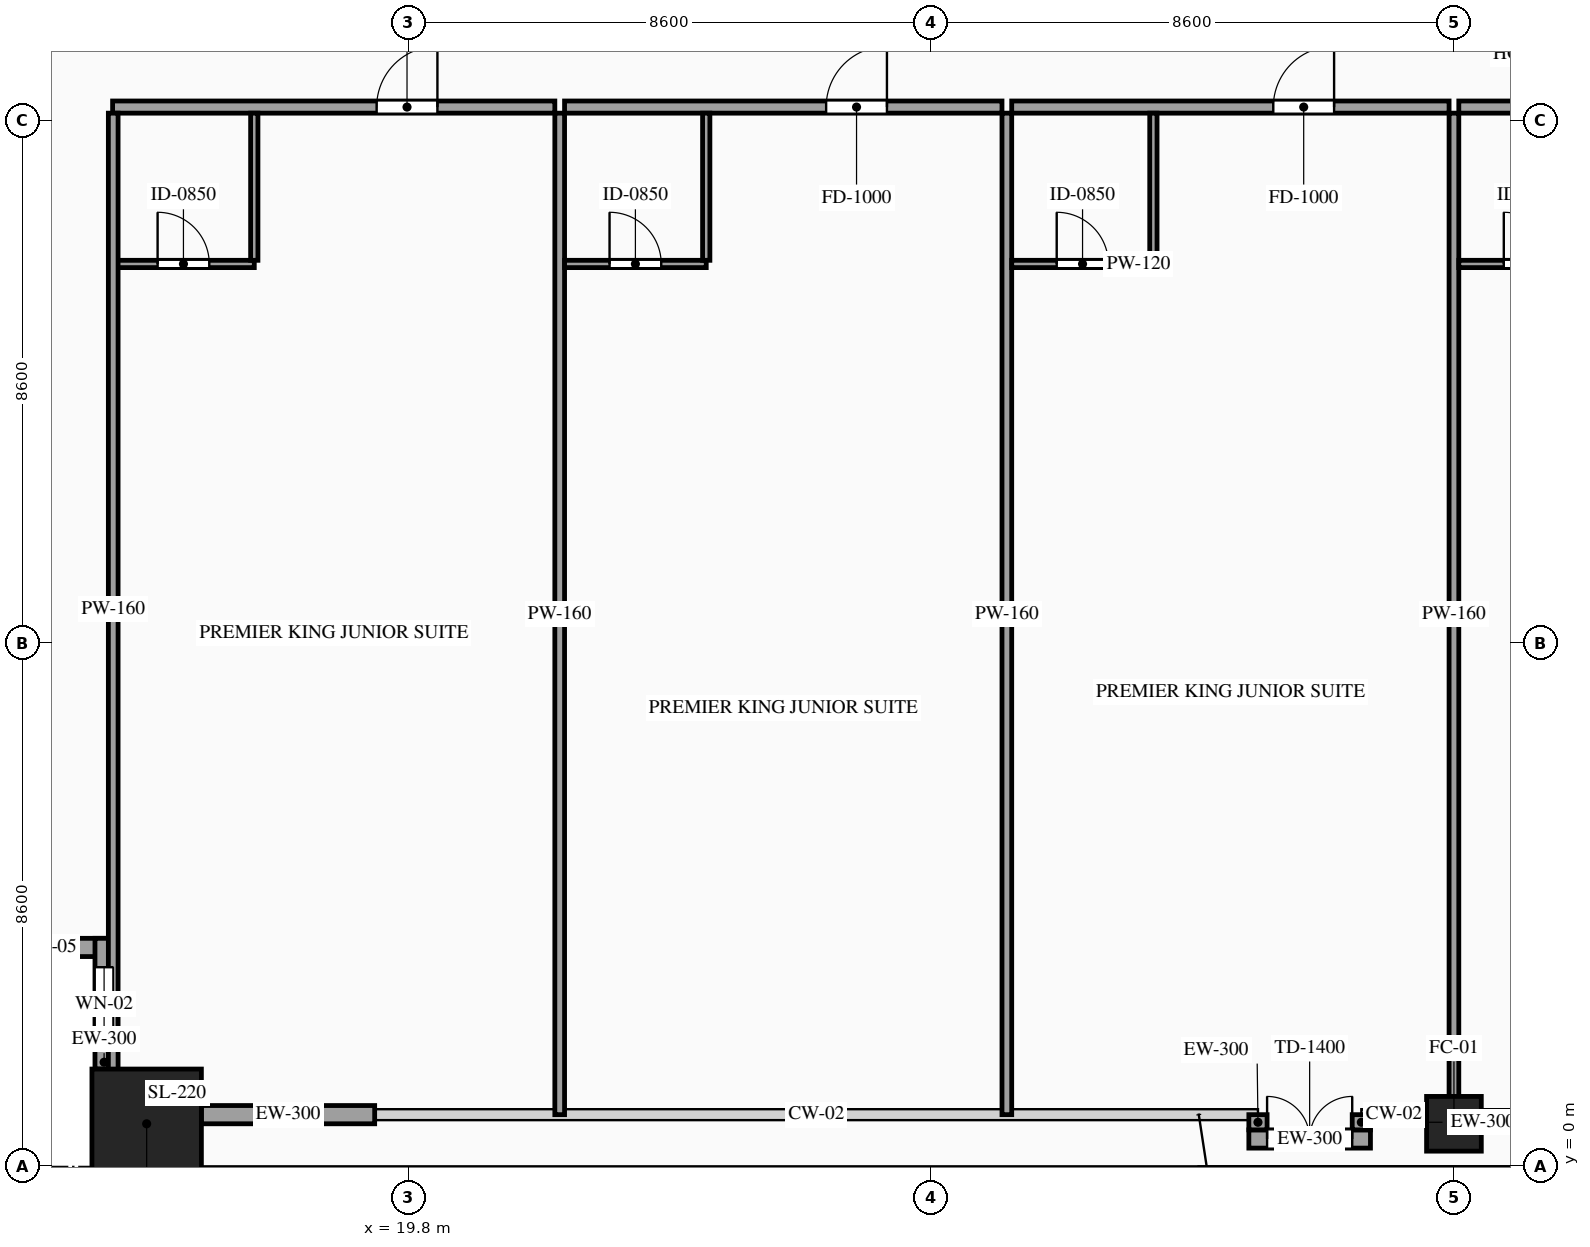
"""IFC4 building model, lengths in metres.
Left out: names, types, materials, properties, quantities, classifications, styles, units other than length and angle.
Written with IfcOpenShell. Run it as: python <this file> out.ifc"""

import sys

from ifc_helpers import new_model, si_unit, direction, frame, frame_2d, origin, origin_2d, place, context, subcontext, project, spatial, rectangle, hollow_rectangle, extrude, source, transform, mapped, element, fill, save


model = new_model("IFC4")
c1 = context("Model", 3, precision=1e-05, world=origin(), true_north=direction((0.0, 1.0)))
c2 = subcontext(c1, "Body", "Model", "MODEL_VIEW")
j1 = project(units=[si_unit("LENGTHUNIT", "METRE"), si_unit("PLANEANGLEUNIT", "RADIAN")], contexts=[c1])
p1 = place(None, origin())
s1 = spatial("IfcSite", under=j1, at=p1, CompositionType="ELEMENT")
p2 = place(p1, origin())
s2 = spatial("IfcBuilding", under=s1, at=p2, CompositionType="ELEMENT")
p3 = place(p2, frame((0.0, 0.0, 34.2)))
s3 = spatial("IfcBuildingStorey", under=s2, at=p3, CompositionType="ELEMENT", Elevation=34.2)
m1 = source(origin(), c2, "Body", "SweptSolid", [
    extrude(hollow_rectangle(XDim=1.8, YDim=1.8, WallThickness=0.08, at=origin_2d()), origin(), (0.0, 0.0, 1.0), 3.6),
])
p4 = place(p3, frame((15.5, 0.7, 0.0), z_axis=(0.0, 0.0, 1.0), x_axis=(1.0, 0.0, 0.0)))
e1 = element("IfcColumn", 1, at=p4, inside=s3, PredefinedType="COLUMN", context=c2, shape_type="MappedRepresentation", body=[
    mapped(m1, transform((0.0, 0.0, 0.0), scale=1.0)),
])
m2 = source(origin(), c2, "Body", "SweptSolid", [
    extrude(hollow_rectangle(XDim=0.9, YDim=0.9, WallThickness=0.042, at=origin_2d()), origin(), (0.0, 0.0, 1.0), 3.6),
])
p5 = place(p3, frame((37.0, 0.7, 0.0), z_axis=(0.0, 0.0, 1.0), x_axis=(1.0, 0.0, 0.0)))
e2 = element("IfcColumn", 2, at=p5, inside=s3, PredefinedType="COLUMN", context=c2, shape_type="MappedRepresentation", body=[
    mapped(m2, transform((0.0, 0.0, 0.0), scale=1.0)),
])
p6 = place(p3, frame((12.8, 3.6, 0.0), z_axis=(0.0, 0.0, 1.0), x_axis=(1.0, 0.0, 0.0)))
e3 = element("IfcWall", 3, at=p6, inside=s3, PredefinedType="SOLIDWALL", context=c2, shape_type="SweptSolid", body=[
    extrude(rectangle(XDim=2.15, YDim=0.3, at=frame_2d((1.075, 0.0))), origin(), (0.0, 0.0, 1.0), 3.38),
])
p7 = place(p6, frame((0.625, 0.0, 0.85)))
e4 = element("IfcOpeningElement", 4, at=p7, cuts=e3, PredefinedType="OPENING", context=c2, shape_type="SweptSolid", body=[
    extrude(rectangle(XDim=0.9, YDim=1.5, at=frame_2d((0.45, 0.75))), frame((0.0, 0.165, 0.0), z_axis=(0.0, -1.0, 0.0), x_axis=(1.0, 0.0, 0.0)), (0.0, 0.0, 1.0), 0.33),
])
p8 = place(p3, frame((14.8, 3.75, 0.0), z_axis=(0.0, 0.0, 1.0), x_axis=(0.0, -1.0, 0.0)))
e5 = element("IfcWall", 5, at=p8, inside=s3, PredefinedType="SOLIDWALL", context=c2, shape_type="SweptSolid", body=[
    extrude(rectangle(XDim=2.15, YDim=0.3, at=frame_2d((1.075, 0.0))), origin(), (0.0, 0.0, 1.0), 3.38),
])
p9 = place(p8, frame((0.475, 0.0, 0.85)))
e6 = element("IfcOpeningElement", 6, at=p9, cuts=e5, PredefinedType="OPENING", context=c2, shape_type="SweptSolid", body=[
    extrude(rectangle(XDim=1.2, YDim=2.1, at=frame_2d((0.6, 1.05))), frame((0.0, 0.165, 0.0), z_axis=(0.0, -1.0, 0.0), x_axis=(1.0, 0.0, 0.0)), (0.0, 0.0, 1.0), 0.33),
])
m3 = source(origin(), c2, "Body", "SweptSolid", [
    extrude(rectangle(XDim=2.85, YDim=0.3, at=frame_2d((1.425, 0.0))), origin(), (0.0, 0.0, 1.0), 2.775),
])
p10 = place(p3, frame((16.4, 0.85, 0.0), z_axis=(0.0, 0.0, 1.0), x_axis=(1.0, 0.0, 0.0)))
e7 = element("IfcWall", 7, at=p10, inside=s3, PredefinedType="SOLIDWALL", context=c2, shape_type="MappedRepresentation", body=[
    mapped(m3, transform((0.0, 0.0, 0.0), scale=1.0)),
])
p11 = place(p3, frame((33.627, 0.45, 0.0), z_axis=(0.0, 0.0, 1.0), x_axis=(1.0, 0.0, 0.0)))
e8 = element("IfcWall", 8, at=p11, inside=s3, PredefinedType="SOLIDWALL", context=c2, shape_type="SweptSolid", body=[
    extrude(rectangle(XDim=2.0, YDim=0.3, at=frame_2d((1.0, 0.0))), origin(), (0.0, 0.0, 1.0), 3.38),
])
p12 = place(p11, frame((0.3, 0.0, 0.0)))
e9 = element("IfcOpeningElement", 9, at=p12, cuts=e8, PredefinedType="OPENING", context=c2, shape_type="SweptSolid", body=[
    extrude(rectangle(XDim=1.4, YDim=2.3, at=frame_2d((0.7, 1.15))), frame((0.0, 0.165, 0.0), z_axis=(0.0, -1.0, 0.0), x_axis=(1.0, 0.0, 0.0)), (0.0, 0.0, 1.0), 0.33),
])
m4 = source(origin(), c2, "Body", "SweptSolid", [
    extrude(rectangle(XDim=0.25, YDim=0.3, at=frame_2d((0.125, 0.0))), origin(), (0.0, 0.0, 1.0), 3.38),
])
for number, where, z_axis, x_axis in (
    (10, (33.777, 0.85, 0.0), (0.0, 0.0, 1.0), (0.0, -1.0, 0.0)),
    (11, (35.477, 0.6, 0.0), (0.0, 0.0, 1.0), (0.0, 1.0, 0.0)),
):
    element("IfcWall", number, at=place(p3, frame(where, z_axis=z_axis, x_axis=x_axis)), inside=s3, PredefinedType="SOLIDWALL", context=c2, shape_type="MappedRepresentation", body=[
        mapped(m4, transform((0.0, 0.0, 0.0), scale=1.0)),
    ])
p13 = place(p3, frame((14.94, 17.42, 0.0), z_axis=(0.0, 0.0, 1.0), x_axis=(1.0, 0.0, 0.0)))
e12 = element("IfcWall", 12, at=p13, inside=s3, PredefinedType="PARTITIONING", context=c2, shape_type="SweptSolid", body=[
    extrude(rectangle(XDim=7.273, YDim=0.2, at=frame_2d((3.636, 0.0))), origin(), (0.0, 0.0, 1.0), 3.38),
])
p14 = place(p13, frame((4.342, 0.0, 0.0)))
e13 = element("IfcOpeningElement", 13, at=p14, cuts=e12, PredefinedType="OPENING", context=c2, shape_type="SweptSolid", body=[
    extrude(rectangle(XDim=1.0, YDim=2.2, at=frame_2d((0.5, 1.1))), frame((0.0, 0.115, 0.0), z_axis=(0.0, -1.0, 0.0), x_axis=(1.0, 0.0, 0.0)), (0.0, 0.0, 1.0), 0.23),
])
m5 = source(origin(), c2, "Body", "SweptSolid", [
    extrude(rectangle(XDim=16.47, YDim=0.16, at=frame_2d((8.235, 0.0))), origin(), (0.0, 0.0, 1.0), 3.38),
])
p15 = place(p3, frame((22.293, 0.85, 0.0), z_axis=(0.0, 0.0, 1.0), x_axis=(0.0, 1.0, 0.0)))
e14 = element("IfcWall", 14, at=p15, inside=s3, PredefinedType="PARTITIONING", context=c2, shape_type="MappedRepresentation", body=[
    mapped(m5, transform((0.0, 0.0, 0.0), scale=1.0)),
])
p16 = place(p3, frame((14.94, 14.84, 0.0), z_axis=(0.0, 0.0, 1.0), x_axis=(1.0, 0.0, 0.0)))
e15 = element("IfcWall", 15, at=p16, inside=s3, PredefinedType="PARTITIONING", context=c2, shape_type="SweptSolid", body=[
    extrude(rectangle(XDim=2.33, YDim=0.12, at=frame_2d((1.165, 0.0))), origin(), (0.0, 0.0, 1.0), 3.38),
])
p17 = place(p16, frame((0.74, 0.0, 0.0)))
e16 = element("IfcOpeningElement", 16, at=p17, cuts=e15, PredefinedType="OPENING", context=c2, shape_type="SweptSolid", body=[
    extrude(rectangle(XDim=0.85, YDim=2.1, at=frame_2d((0.425, 1.05))), frame((0.0, 0.075, 0.0), z_axis=(0.0, -1.0, 0.0), x_axis=(1.0, 0.0, 0.0)), (0.0, 0.0, 1.0), 0.15),
])
m6 = source(origin(), c2, "Body", "SweptSolid", [
    extrude(rectangle(XDim=2.42, YDim=0.12, at=frame_2d((1.21, 0.0))), origin(), (0.0, 0.0, 1.0), 3.38),
])
p18 = place(p3, frame((17.27, 14.9, 0.0), z_axis=(0.0, 0.0, 1.0), x_axis=(0.0, 1.0, 0.0)))
e17 = element("IfcWall", 17, at=p18, inside=s3, PredefinedType="PARTITIONING", context=c2, shape_type="MappedRepresentation", body=[
    mapped(m6, transform((0.0, 0.0, 0.0), scale=1.0)),
])
p19 = place(p3, frame((22.373, 17.42, 0.0), z_axis=(0.0, 0.0, 1.0), x_axis=(1.0, 0.0, 0.0)))
e18 = element("IfcWall", 18, at=p19, inside=s3, PredefinedType="PARTITIONING", context=c2, shape_type="SweptSolid", body=[
    extrude(rectangle(XDim=7.194, YDim=0.2, at=frame_2d((3.597, 0.0))), origin(), (0.0, 0.0, 1.0), 3.38),
])
p20 = place(p19, frame((4.302, 0.0, 0.0)))
e19 = element("IfcOpeningElement", 19, at=p20, cuts=e18, PredefinedType="OPENING", context=c2, shape_type="SweptSolid", body=[
    extrude(rectangle(XDim=1.0, YDim=2.2, at=frame_2d((0.5, 1.1))), frame((0.0, 0.115, 0.0), z_axis=(0.0, -1.0, 0.0), x_axis=(1.0, 0.0, 0.0)), (0.0, 0.0, 1.0), 0.23),
])
p21 = place(p3, frame((29.647, 0.85, 0.0), z_axis=(0.0, 0.0, 1.0), x_axis=(0.0, 1.0, 0.0)))
e20 = element("IfcWall", 20, at=p21, inside=s3, PredefinedType="PARTITIONING", context=c2, shape_type="MappedRepresentation", body=[
    mapped(m5, transform((0.0, 0.0, 0.0), scale=1.0)),
])
p22 = place(p3, frame((22.373, 14.84, 0.0), z_axis=(0.0, 0.0, 1.0), x_axis=(1.0, 0.0, 0.0)))
e21 = element("IfcWall", 21, at=p22, inside=s3, PredefinedType="PARTITIONING", context=c2, shape_type="SweptSolid", body=[
    extrude(rectangle(XDim=2.33, YDim=0.12, at=frame_2d((1.165, 0.0))), origin(), (0.0, 0.0, 1.0), 3.38),
])
p23 = place(p22, frame((0.74, 0.0, 0.0)))
e22 = element("IfcOpeningElement", 22, at=p23, cuts=e21, PredefinedType="OPENING", context=c2, shape_type="SweptSolid", body=[
    extrude(rectangle(XDim=0.85, YDim=2.1, at=frame_2d((0.425, 1.05))), frame((0.0, 0.075, 0.0), z_axis=(0.0, -1.0, 0.0), x_axis=(1.0, 0.0, 0.0)), (0.0, 0.0, 1.0), 0.15),
])
p24 = place(p3, frame((24.703, 14.9, 0.0), z_axis=(0.0, 0.0, 1.0), x_axis=(0.0, 1.0, 0.0)))
e23 = element("IfcWall", 23, at=p24, inside=s3, PredefinedType="PARTITIONING", context=c2, shape_type="MappedRepresentation", body=[
    mapped(m6, transform((0.0, 0.0, 0.0), scale=1.0)),
])
p25 = place(p3, frame((29.727, 17.42, 0.0), z_axis=(0.0, 0.0, 1.0), x_axis=(1.0, 0.0, 0.0)))
e24 = element("IfcWall", 24, at=p25, inside=s3, PredefinedType="PARTITIONING", context=c2, shape_type="SweptSolid", body=[
    extrude(rectangle(XDim=7.193, YDim=0.2, at=frame_2d((3.596, 0.0))), origin(), (0.0, 0.0, 1.0), 3.38),
])
p26 = place(p25, frame((4.302, 0.0, 0.0)))
e25 = element("IfcOpeningElement", 25, at=p26, cuts=e24, PredefinedType="OPENING", context=c2, shape_type="SweptSolid", body=[
    extrude(rectangle(XDim=1.0, YDim=2.2, at=frame_2d((0.5, 1.1))), frame((0.0, 0.115, 0.0), z_axis=(0.0, -1.0, 0.0), x_axis=(1.0, 0.0, 0.0)), (0.0, 0.0, 1.0), 0.23),
])
m7 = source(origin(), c2, "Body", "SweptSolid", [
    extrude(rectangle(XDim=16.47, YDim=0.16, at=frame_2d((8.235, 0.0))), origin(), (0.0, 0.0, 1.0), 2.575),
])
p27 = place(p3, frame((37.0, 0.85, 0.0), z_axis=(0.0, 0.0, 1.0), x_axis=(0.0, 1.0, 0.0)))
e26 = element("IfcWall", 26, at=p27, inside=s3, PredefinedType="PARTITIONING", context=c2, shape_type="MappedRepresentation", body=[
    mapped(m7, transform((0.0, 0.0, 0.0), scale=1.0)),
])
p28 = place(p3, frame((29.727, 14.84, 0.0), z_axis=(0.0, 0.0, 1.0), x_axis=(1.0, 0.0, 0.0)))
e27 = element("IfcWall", 27, at=p28, inside=s3, PredefinedType="PARTITIONING", context=c2, shape_type="SweptSolid", body=[
    extrude(rectangle(XDim=2.33, YDim=0.12, at=frame_2d((1.165, 0.0))), origin(), (0.0, 0.0, 1.0), 3.38),
])
p29 = place(p28, frame((0.74, 0.0, 0.0)))
e28 = element("IfcOpeningElement", 28, at=p29, cuts=e27, PredefinedType="OPENING", context=c2, shape_type="SweptSolid", body=[
    extrude(rectangle(XDim=0.85, YDim=2.1, at=frame_2d((0.425, 1.05))), frame((0.0, 0.075, 0.0), z_axis=(0.0, -1.0, 0.0), x_axis=(1.0, 0.0, 0.0)), (0.0, 0.0, 1.0), 0.15),
])
p30 = place(p3, frame((32.057, 14.9, 0.0), z_axis=(0.0, 0.0, 1.0), x_axis=(0.0, 1.0, 0.0)))
e29 = element("IfcWall", 29, at=p30, inside=s3, PredefinedType="PARTITIONING", context=c2, shape_type="MappedRepresentation", body=[
    mapped(m6, transform((0.0, 0.0, 0.0), scale=1.0)),
])
p31 = place(p3, frame((37.08, 17.42, 0.0), z_axis=(0.0, 0.0, 1.0), x_axis=(1.0, 0.0, 0.0)))
e30 = element("IfcWall", 30, at=p31, inside=s3, PredefinedType="PARTITIONING", context=c2, shape_type="SweptSolid", body=[
    extrude(rectangle(XDim=7.193, YDim=0.2, at=frame_2d((3.596, 0.0))), origin(), (0.0, 0.0, 1.0), 3.38),
])
p32 = place(p31, frame((4.302, 0.0, 0.0)))
e31 = element("IfcOpeningElement", 31, at=p32, cuts=e30, PredefinedType="OPENING", context=c2, shape_type="SweptSolid", body=[
    extrude(rectangle(XDim=1.0, YDim=2.2, at=frame_2d((0.5, 1.1))), frame((0.0, 0.115, 0.0), z_axis=(0.0, -1.0, 0.0), x_axis=(1.0, 0.0, 0.0)), (0.0, 0.0, 1.0), 0.23),
])
p33 = place(p3, frame((37.08, 14.84, 0.0), z_axis=(0.0, 0.0, 1.0), x_axis=(1.0, 0.0, 0.0)))
e32 = element("IfcWall", 32, at=p33, inside=s3, PredefinedType="PARTITIONING", context=c2, shape_type="SweptSolid", body=[
    extrude(rectangle(XDim=2.33, YDim=0.12, at=frame_2d((1.165, 0.0))), origin(), (0.0, 0.0, 1.0), 3.38),
])
p34 = place(p33, frame((0.74, 0.0, 0.0)))
e33 = element("IfcOpeningElement", 33, at=p34, cuts=e32, PredefinedType="OPENING", context=c2, shape_type="SweptSolid", body=[
    extrude(rectangle(XDim=0.85, YDim=2.1, at=frame_2d((0.425, 1.05))), frame((0.0, 0.075, 0.0), z_axis=(0.0, -1.0, 0.0), x_axis=(1.0, 0.0, 0.0)), (0.0, 0.0, 1.0), 0.15),
])
m8 = source(origin(), c2, "Body", "SweptSolid", [
    extrude(rectangle(XDim=16.32, YDim=0.16, at=frame_2d((8.16, 0.0))), origin(), (0.0, 0.0, 1.0), 3.38),
])
p35 = place(p3, frame((14.95, 1.0, 0.0), z_axis=(0.0, 0.0, 1.0), x_axis=(0.0, 1.0, 0.0)))
e34 = element("IfcWall", 34, at=p35, inside=s3, PredefinedType="PARTITIONING", context=c2, shape_type="MappedRepresentation", body=[
    mapped(m8, transform((0.0, 0.0, 0.0), scale=1.0)),
])
m9 = source(origin(), c2, "Body", "SweptSolid", [
    extrude(rectangle(XDim=0.9, YDim=1.5, at=frame_2d((0.45, 0.75))), frame((0.0, 0.03, 0.0), z_axis=(0.0, -1.0, 0.0), x_axis=(1.0, 0.0, 0.0)), (0.0, 0.0, 1.0), 0.06),
])
p36 = place(p7, origin())
e35 = element("IfcWindow", 35, at=p36, inside=s3, PartitioningType="SINGLE_PANEL", PredefinedType="WINDOW", context=c2, shape_type="MappedRepresentation", body=[
    mapped(m9, transform((0.0, 0.0, 0.0), scale=1.0)),
])
fill(e4, e35)
m10 = source(origin(), c2, "Body", "SweptSolid", [
    extrude(rectangle(XDim=1.2, YDim=2.1, at=frame_2d((0.6, 1.05))), frame((0.0, 0.03, 0.0), z_axis=(0.0, -1.0, 0.0), x_axis=(1.0, 0.0, 0.0)), (0.0, 0.0, 1.0), 0.06),
])
p37 = place(p9, origin())
e36 = element("IfcWindow", 36, at=p37, inside=s3, PartitioningType="SINGLE_PANEL", PredefinedType="WINDOW", context=c2, shape_type="MappedRepresentation", body=[
    mapped(m10, transform((0.0, 0.0, 0.0), scale=1.0)),
])
fill(e6, e36)
m11 = source(origin(), c2, "Body", "SweptSolid", [
    extrude(rectangle(XDim=1.4, YDim=2.3, at=frame_2d((0.7, 1.15))), frame((0.0, 0.025, 0.0), z_axis=(0.0, -1.0, 0.0), x_axis=(1.0, 0.0, 0.0)), (0.0, 0.0, 1.0), 0.05),
])
p38 = place(p12, origin())
e37 = element("IfcDoor", 37, at=p38, inside=s3, OperationType="DOUBLE_DOOR_SINGLE_SWING", PredefinedType="DOOR", context=c2, shape_type="MappedRepresentation", body=[
    mapped(m11, transform((0.0, 0.0, 0.0), scale=1.0)),
])
fill(e9, e37)
m12 = source(origin(), c2, "Body", "SweptSolid", [
    extrude(rectangle(XDim=1.0, YDim=2.2, at=frame_2d((0.5, 1.1))), frame((0.0, 0.025, 0.0), z_axis=(0.0, -1.0, 0.0), x_axis=(1.0, 0.0, 0.0)), (0.0, 0.0, 1.0), 0.05),
])
p39 = place(p14, origin())
e38 = element("IfcDoor", 38, at=p39, inside=s3, OperationType="SINGLE_SWING_RIGHT", PredefinedType="DOOR", context=c2, shape_type="MappedRepresentation", body=[
    mapped(m12, transform((0.0, 0.0, 0.0), scale=1.0)),
])
fill(e13, e38)
m13 = source(origin(), c2, "Body", "SweptSolid", [
    extrude(rectangle(XDim=0.85, YDim=2.1, at=frame_2d((0.425, 1.05))), frame((0.0, 0.025, 0.0), z_axis=(0.0, -1.0, 0.0), x_axis=(1.0, 0.0, 0.0)), (0.0, 0.0, 1.0), 0.05),
])
p40 = place(p17, origin())
e39 = element("IfcDoor", 39, at=p40, inside=s3, OperationType="SINGLE_SWING_LEFT", PredefinedType="DOOR", context=c2, shape_type="MappedRepresentation", body=[
    mapped(m13, transform((0.0, 0.0, 0.0), scale=1.0)),
])
fill(e16, e39)
p41 = place(p20, origin())
e40 = element("IfcDoor", 40, at=p41, inside=s3, OperationType="SINGLE_SWING_RIGHT", PredefinedType="DOOR", context=c2, shape_type="MappedRepresentation", body=[
    mapped(m12, transform((0.0, 0.0, 0.0), scale=1.0)),
])
fill(e19, e40)
p42 = place(p23, origin())
e41 = element("IfcDoor", 41, at=p42, inside=s3, OperationType="SINGLE_SWING_LEFT", PredefinedType="DOOR", context=c2, shape_type="MappedRepresentation", body=[
    mapped(m13, transform((0.0, 0.0, 0.0), scale=1.0)),
])
fill(e22, e41)
p43 = place(p26, origin())
e42 = element("IfcDoor", 42, at=p43, inside=s3, OperationType="SINGLE_SWING_RIGHT", PredefinedType="DOOR", context=c2, shape_type="MappedRepresentation", body=[
    mapped(m12, transform((0.0, 0.0, 0.0), scale=1.0)),
])
fill(e25, e42)
p44 = place(p29, origin())
e43 = element("IfcDoor", 43, at=p44, inside=s3, OperationType="SINGLE_SWING_LEFT", PredefinedType="DOOR", context=c2, shape_type="MappedRepresentation", body=[
    mapped(m13, transform((0.0, 0.0, 0.0), scale=1.0)),
])
fill(e28, e43)
p45 = place(p34, origin())
e44 = element("IfcDoor", 44, at=p45, inside=s3, OperationType="SINGLE_SWING_LEFT", PredefinedType="DOOR", context=c2, shape_type="MappedRepresentation", body=[
    mapped(m13, transform((0.0, 0.0, 0.0), scale=1.0)),
])
fill(e33, e44)
save(model, sys.argv[1])
